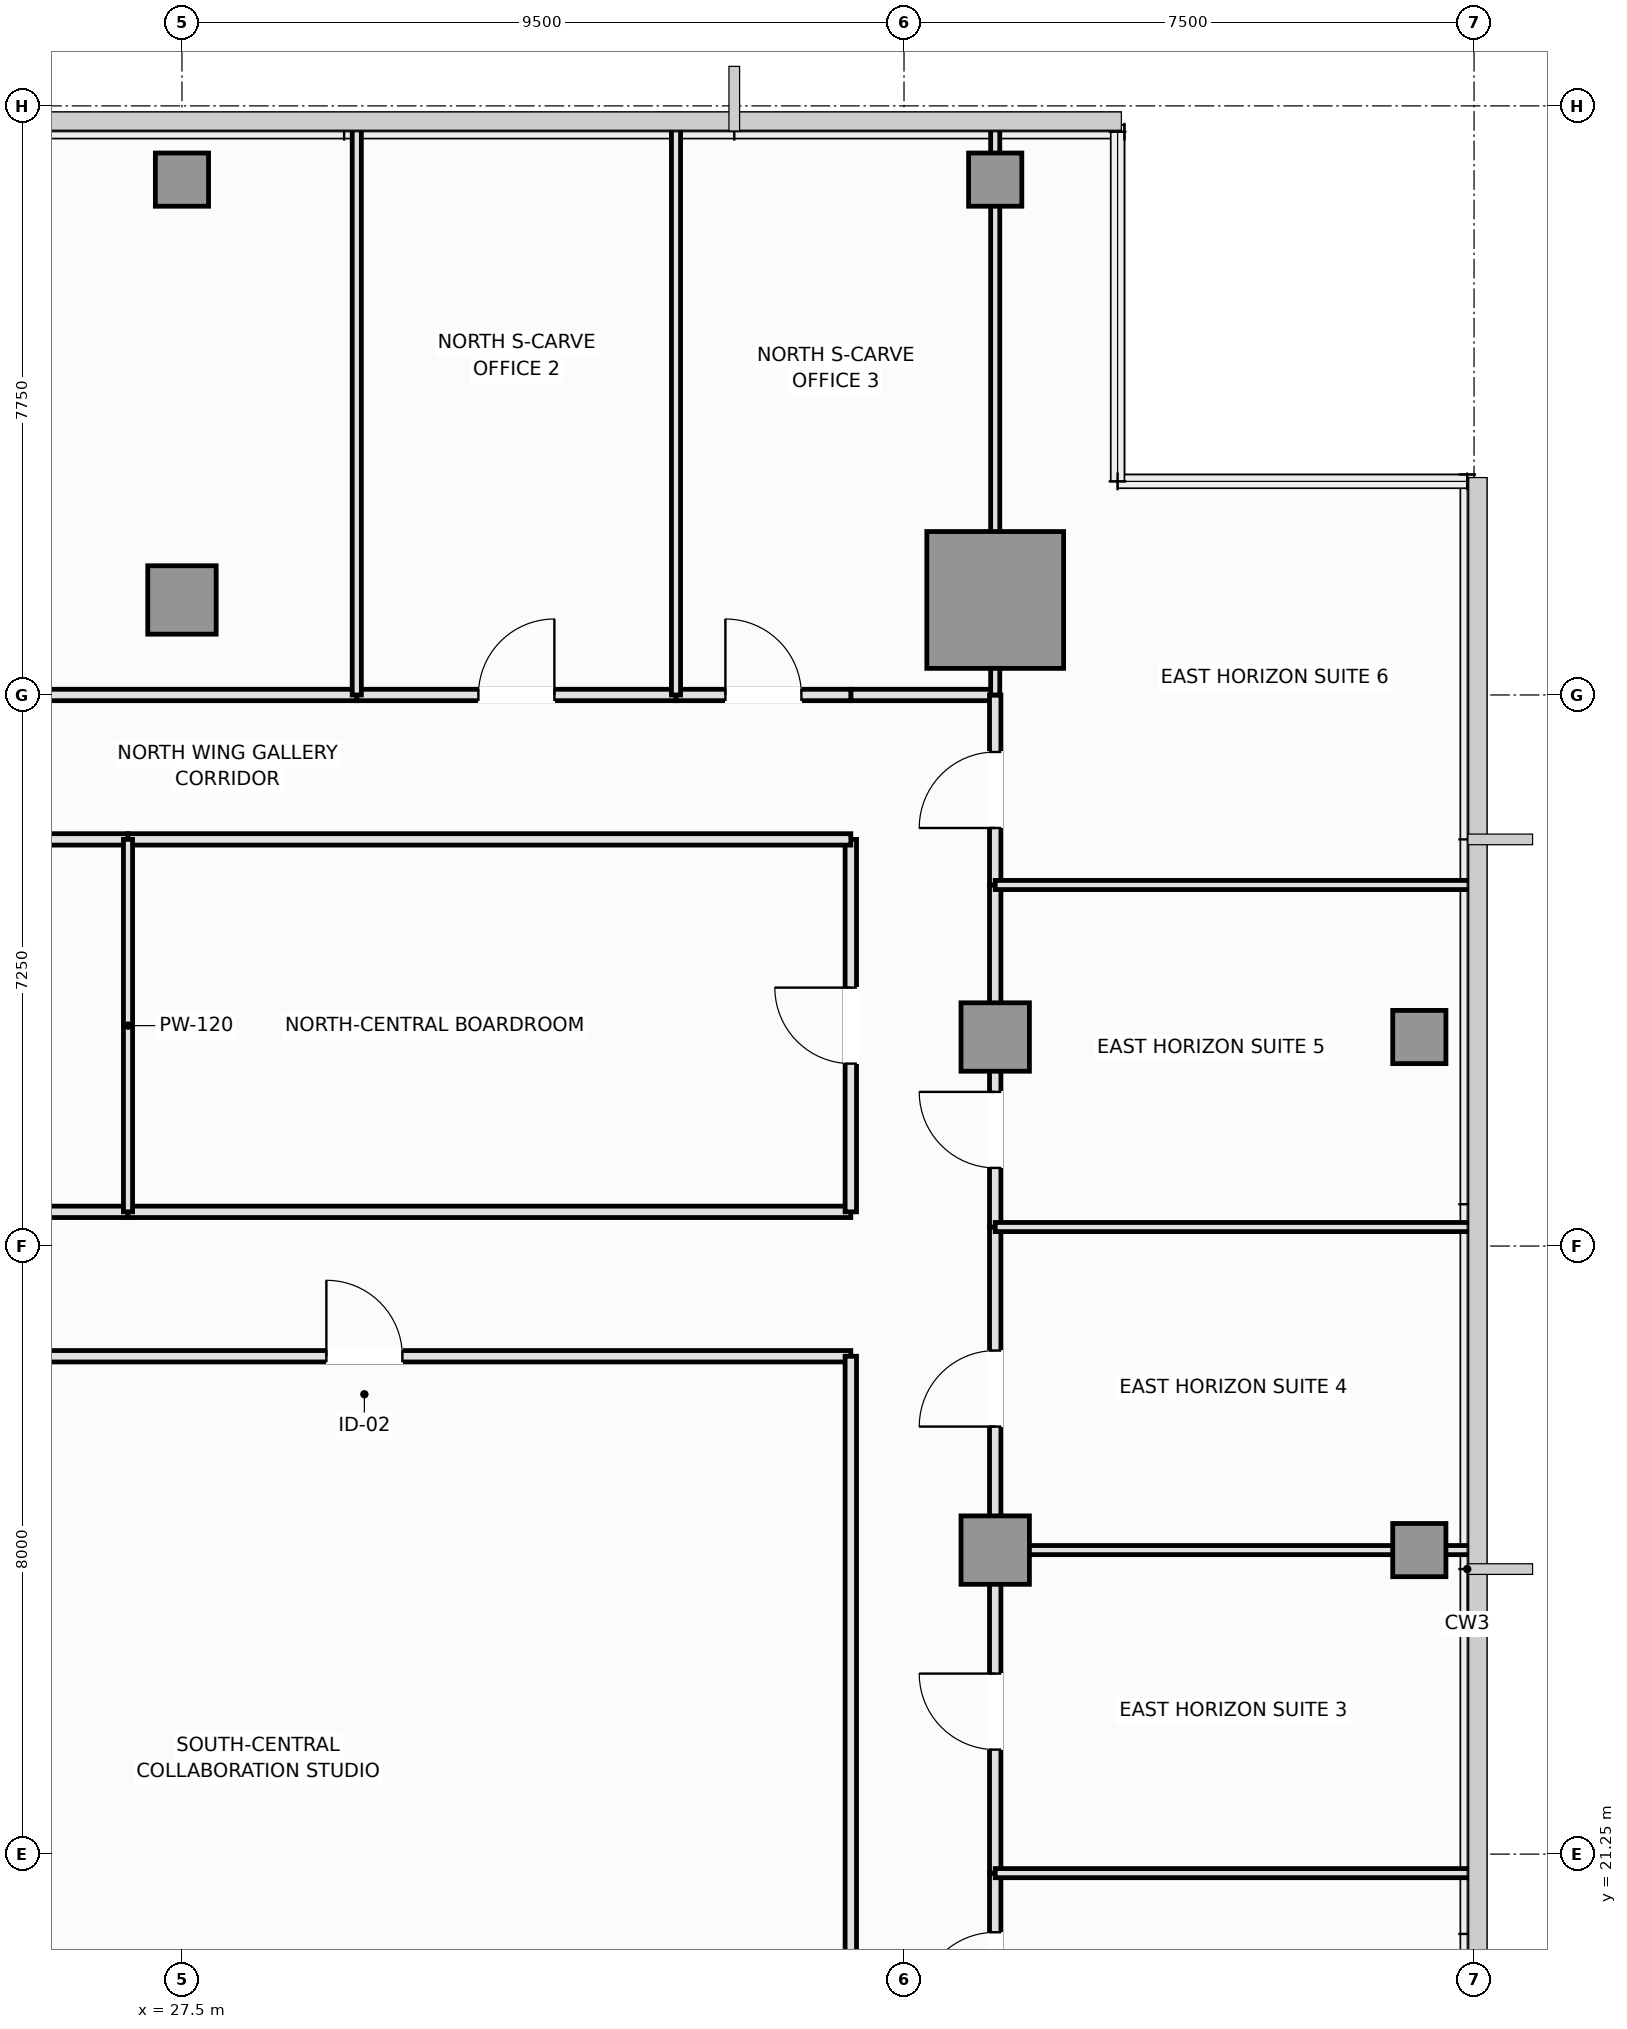
"""IFC4 building model, lengths in metres.
Left out: names, types, materials, properties, quantities, classifications, styles, units other than length and angle.
Written with IfcOpenShell. Run it as: python <this file> out.ifc"""

import sys

from ifc_helpers import new_model, si_unit, direction, frame, frame_2d, origin, origin_2d, place, context, subcontext, project, spatial, rectangle, extrude, element, fill, save


model = new_model("IFC4")
c1 = context("Model", 3, precision=1e-05, world=origin(), true_north=direction((0.0, 1.0)))
c2 = subcontext(c1, "Body", "Model", "MODEL_VIEW")
j1 = project(units=[si_unit("LENGTHUNIT", "METRE"), si_unit("PLANEANGLEUNIT", "RADIAN")], contexts=[c1])
p1 = place(None, origin())
s1 = spatial("IfcSite", under=j1, at=p1, CompositionType="ELEMENT")
p2 = place(p1, origin())
s2 = spatial("IfcBuilding", under=s1, at=p2, CompositionType="ELEMENT")
p3 = place(p2, frame((0.0, 0.0, 281.2)))
s3 = spatial("IfcBuildingStorey", under=s2, at=p3, CompositionType="ELEMENT", Elevation=281.2)
p4 = place(p3, frame((38.2, 37.75, 0.0), z_axis=(0.0, 0.0, 1.0), x_axis=(1.0, 0.0, 0.0)))
e1 = element("IfcColumn", 1, at=p4, inside=s3, PredefinedType="COLUMN", context=c2, shape_type="SweptSolid", body=[
    extrude(rectangle(XDim=1.8, YDim=1.8, at=origin_2d()), origin(), (0.0, 0.0, 1.0), 3.55),
])
for number, where, z_axis, x_axis in (
    (2, (27.5, 37.75, 0.0), (0.0, 0.0, 1.0), (1.0, 0.0, 0.0)),
    (3, (38.2, 25.25, 0.0), (0.0, 0.0, 1.0), (1.0, 0.0, 0.0)),
    (4, (38.2, 32.0, 0.0), (0.0, 0.0, 1.0), (1.0, 0.0, 0.0)),
):
    element("IfcColumn", number, at=place(p3, frame(where, z_axis=z_axis, x_axis=x_axis)), inside=s3, PredefinedType="COLUMN", context=c2, shape_type="SweptSolid", body=[
        extrude(rectangle(XDim=0.9, YDim=0.9, at=origin_2d()), origin(), (0.0, 0.0, 1.0), 3.55),
    ])
for number, where, z_axis, x_axis in (
    (5, (43.78, 25.25, 0.0), (0.0, 0.0, 1.0), (1.0, 0.0, 0.0)),
    (6, (43.78, 32.0, 0.0), (0.0, 0.0, 1.0), (1.0, 0.0, 0.0)),
    (7, (27.5, 43.28, 0.0), (0.0, 0.0, 1.0), (1.0, 0.0, 0.0)),
    (8, (38.2, 43.28, 0.0), (0.0, 0.0, 1.0), (1.0, 0.0, 0.0)),
):
    element("IfcColumn", number, at=place(p3, frame(where, z_axis=z_axis, x_axis=x_axis)), inside=s3, PredefinedType="COLUMN", context=c2, shape_type="SweptSolid", body=[
        extrude(rectangle(XDim=0.7, YDim=0.7, at=origin_2d()), origin(), (0.0, 0.0, 1.0), 3.55),
    ])
p5 = place(p3, frame((19.9, 29.7, 0.0), z_axis=(0.0, 0.0, 1.0), x_axis=(1.0, 0.0, 0.0)))
e9 = element("IfcWall", 9, at=p5, inside=s3, PredefinedType="PARTITIONING", context=c2, shape_type="SweptSolid", body=[
    extrude(rectangle(XDim=6.89, YDim=0.15, at=frame_2d((3.445, 0.0))), origin(), (0.0, 0.0, 1.0), 3.39),
])
p6 = place(p3, frame((26.79, 29.7, 0.0), z_axis=(0.0, 0.0, 1.0), x_axis=(1.0, 0.0, 0.0)))
e10 = element("IfcWall", 10, at=p6, inside=s3, PredefinedType="PARTITIONING", context=c2, shape_type="SweptSolid", body=[
    extrude(rectangle(XDim=9.51, YDim=0.15, at=frame_2d((4.755, 0.0))), origin(), (0.0, 0.0, 1.0), 3.39),
])
p7 = place(p3, frame((23.5, 27.8, 0.0), z_axis=(0.0, 0.0, 1.0), x_axis=(1.0, 0.0, 0.0)))
e11 = element("IfcWall", 11, at=p7, inside=s3, PredefinedType="PARTITIONING", context=c2, shape_type="SweptSolid", body=[
    extrude(rectangle(XDim=12.8, YDim=0.15, at=frame_2d((6.4, 0.0))), origin(), (0.0, 0.0, 1.0), 3.39),
])
p8 = place(p7, frame((5.9, 0.0, 0.0)))
e12 = element("IfcOpeningElement", 12, at=p8, cuts=e11, PredefinedType="OPENING", context=c2, shape_type="SweptSolid", body=[
    extrude(rectangle(XDim=1.0, YDim=2.15, at=frame_2d((0.5, 1.075))), frame((0.0, 0.085, 0.0), z_axis=(0.0, -1.0, 0.0), x_axis=(1.0, 0.0, 0.0)), (0.0, 0.0, 1.0), 0.17),
])
p9 = place(p3, frame((36.3, 29.7, 0.0), z_axis=(0.0, 0.0, 1.0), x_axis=(0.0, 1.0, 0.0)))
e13 = element("IfcWall", 13, at=p9, inside=s3, PredefinedType="PARTITIONING", context=c2, shape_type="SweptSolid", body=[
    extrude(rectangle(XDim=4.9, YDim=0.15, at=frame_2d((2.45, 0.0))), origin(), (0.0, 0.0, 1.0), 3.39),
])
p10 = place(p9, frame((1.95, 0.0, 0.0)))
e14 = element("IfcOpeningElement", 14, at=p10, cuts=e13, PredefinedType="OPENING", context=c2, shape_type="SweptSolid", body=[
    extrude(rectangle(XDim=1.0, YDim=2.15, at=frame_2d((0.5, 1.075))), frame((0.0, 0.085, 0.0), z_axis=(0.0, -1.0, 0.0), x_axis=(1.0, 0.0, 0.0)), (0.0, 0.0, 1.0), 0.17),
])
p11 = place(p3, frame((36.3, 17.6, 0.0), z_axis=(0.0, 0.0, 1.0), x_axis=(0.0, 1.0, 0.0)))
e15 = element("IfcWall", 15, at=p11, inside=s3, PredefinedType="PARTITIONING", context=c2, shape_type="SweptSolid", body=[
    extrude(rectangle(XDim=10.2, YDim=0.15, at=frame_2d((5.1, 0.0))), origin(), (0.0, 0.0, 1.0), 3.39),
])
p12 = place(p3, frame((36.3, 36.5, 0.0), z_axis=(0.0, 0.0, 1.0), x_axis=(1.0, 0.0, 0.0)))
e16 = element("IfcWall", 16, at=p12, inside=s3, PredefinedType="PARTITIONING", context=c2, shape_type="SweptSolid", body=[
    extrude(rectangle(XDim=1.9, YDim=0.15, at=frame_2d((0.95, 0.0))), origin(), (0.0, 0.0, 1.0), 3.39),
])
p13 = place(p3, frame((38.2, 16.5, 0.0), z_axis=(0.0, 0.0, 1.0), x_axis=(0.0, 1.0, 0.0)))
e17 = element("IfcWall", 17, at=p13, inside=s3, PredefinedType="PARTITIONING", context=c2, shape_type="SweptSolid", body=[
    extrude(rectangle(XDim=4.5, YDim=0.15, at=frame_2d((2.25, 0.0))), origin(), (0.0, 0.0, 1.0), 2.99),
])
p14 = place(p13, frame((2.722, 0.0, 0.0)))
e18 = element("IfcOpeningElement", 18, at=p14, cuts=e17, PredefinedType="OPENING", context=c2, shape_type="SweptSolid", body=[
    extrude(rectangle(XDim=1.0, YDim=2.15, at=frame_2d((0.5, 1.075))), frame((0.0, 0.085, 0.0), z_axis=(0.0, -1.0, 0.0), x_axis=(1.0, 0.0, 0.0)), (0.0, 0.0, 1.0), 0.17),
])
p15 = place(p3, frame((38.2, 21.0, 0.0), z_axis=(0.0, 0.0, 1.0), x_axis=(0.0, 1.0, 0.0)))
e19 = element("IfcWall", 19, at=p15, inside=s3, PredefinedType="PARTITIONING", context=c2, shape_type="SweptSolid", body=[
    extrude(rectangle(XDim=4.25, YDim=0.15, at=frame_2d((2.125, 0.0))), origin(), (0.0, 0.0, 1.0), 2.99),
])
p16 = place(p15, frame((1.625, 0.0, 0.0)))
e20 = element("IfcOpeningElement", 20, at=p16, cuts=e19, PredefinedType="OPENING", context=c2, shape_type="SweptSolid", body=[
    extrude(rectangle(XDim=1.0, YDim=2.15, at=frame_2d((0.5, 1.075))), frame((0.0, 0.085, 0.0), z_axis=(0.0, -1.0, 0.0), x_axis=(1.0, 0.0, 0.0)), (0.0, 0.0, 1.0), 0.17),
])
p17 = place(p3, frame((38.2, 25.25, 0.0), z_axis=(0.0, 0.0, 1.0), x_axis=(0.0, 1.0, 0.0)))
e21 = element("IfcWall", 21, at=p17, inside=s3, PredefinedType="PARTITIONING", context=c2, shape_type="SweptSolid", body=[
    extrude(rectangle(XDim=4.25, YDim=0.15, at=frame_2d((2.125, 0.0))), origin(), (0.0, 0.0, 1.0), 2.99),
])
p18 = place(p17, frame((1.625, 0.0, 0.0)))
e22 = element("IfcOpeningElement", 22, at=p18, cuts=e21, PredefinedType="OPENING", context=c2, shape_type="SweptSolid", body=[
    extrude(rectangle(XDim=1.0, YDim=2.15, at=frame_2d((0.5, 1.075))), frame((0.0, 0.085, 0.0), z_axis=(0.0, -1.0, 0.0), x_axis=(1.0, 0.0, 0.0)), (0.0, 0.0, 1.0), 0.17),
])
p19 = place(p3, frame((38.2, 29.5, 0.0), z_axis=(0.0, 0.0, 1.0), x_axis=(0.0, 1.0, 0.0)))
e23 = element("IfcWall", 23, at=p19, inside=s3, PredefinedType="PARTITIONING", context=c2, shape_type="SweptSolid", body=[
    extrude(rectangle(XDim=4.5, YDim=0.15, at=frame_2d((2.25, 0.0))), origin(), (0.0, 0.0, 1.0), 2.99),
])
p20 = place(p19, frame((0.778, 0.0, 0.0)))
e24 = element("IfcOpeningElement", 24, at=p20, cuts=e23, PredefinedType="OPENING", context=c2, shape_type="SweptSolid", body=[
    extrude(rectangle(XDim=1.0, YDim=2.15, at=frame_2d((0.5, 1.075))), frame((0.0, 0.085, 0.0), z_axis=(0.0, -1.0, 0.0), x_axis=(1.0, 0.0, 0.0)), (0.0, 0.0, 1.0), 0.17),
])
p21 = place(p3, frame((38.2, 34.0, 0.0), z_axis=(0.0, 0.0, 1.0), x_axis=(0.0, 1.0, 0.0)))
e25 = element("IfcWall", 25, at=p21, inside=s3, PredefinedType="PARTITIONING", context=c2, shape_type="SweptSolid", body=[
    extrude(rectangle(XDim=2.5, YDim=0.15, at=frame_2d((1.25, 0.0))), origin(), (0.0, 0.0, 1.0), 2.99),
])
p22 = place(p21, frame((0.75, 0.0, 0.0)))
e26 = element("IfcOpeningElement", 26, at=p22, cuts=e25, PredefinedType="OPENING", context=c2, shape_type="SweptSolid", body=[
    extrude(rectangle(XDim=1.0, YDim=2.15, at=frame_2d((0.5, 1.075))), frame((0.0, 0.085, 0.0), z_axis=(0.0, -1.0, 0.0), x_axis=(1.0, 0.0, 0.0)), (0.0, 0.0, 1.0), 0.17),
])
p23 = place(p3, frame((19.9, 34.6, 0.0), z_axis=(0.0, 0.0, 1.0), x_axis=(1.0, 0.0, 0.0)))
e27 = element("IfcWall", 27, at=p23, inside=s3, PredefinedType="PARTITIONING", context=c2, shape_type="SweptSolid", body=[
    extrude(rectangle(XDim=6.89, YDim=0.15, at=frame_2d((3.445, 0.0))), origin(), (0.0, 0.0, 1.0), 3.39),
])
p24 = place(p3, frame((26.79, 34.6, 0.0), z_axis=(0.0, 0.0, 1.0), x_axis=(1.0, 0.0, 0.0)))
e28 = element("IfcWall", 28, at=p24, inside=s3, PredefinedType="PARTITIONING", context=c2, shape_type="SweptSolid", body=[
    extrude(rectangle(XDim=9.51, YDim=0.15, at=frame_2d((4.755, 0.0))), origin(), (0.0, 0.0, 1.0), 3.39),
])
p25 = place(p3, frame((19.9, 36.5, 0.0), z_axis=(0.0, 0.0, 1.0), x_axis=(1.0, 0.0, 0.0)))
e29 = element("IfcWall", 29, at=p25, inside=s3, PredefinedType="PARTITIONING", context=c2, shape_type="SweptSolid", body=[
    extrude(rectangle(XDim=9.9, YDim=0.15, at=frame_2d((4.95, 0.0))), origin(), (0.0, 0.0, 1.0), 3.39),
])
p26 = place(p3, frame((29.8, 36.5, 0.0), z_axis=(0.0, 0.0, 1.0), x_axis=(1.0, 0.0, 0.0)))
e30 = element("IfcWall", 30, at=p26, inside=s3, PredefinedType="PARTITIONING", context=c2, shape_type="SweptSolid", body=[
    extrude(rectangle(XDim=4.2, YDim=0.15, at=frame_2d((2.1, 0.0))), origin(), (0.0, 0.0, 1.0), 3.39),
])
p27 = place(p26, frame((1.6, 0.0, 0.0)))
e31 = element("IfcOpeningElement", 31, at=p27, cuts=e30, PredefinedType="OPENING", context=c2, shape_type="SweptSolid", body=[
    extrude(rectangle(XDim=1.0, YDim=2.15, at=frame_2d((0.5, 1.075))), frame((0.0, 0.085, 0.0), z_axis=(0.0, -1.0, 0.0), x_axis=(1.0, 0.0, 0.0)), (0.0, 0.0, 1.0), 0.17),
])
p28 = place(p3, frame((34.0, 36.5, 0.0), z_axis=(0.0, 0.0, 1.0), x_axis=(1.0, 0.0, 0.0)))
e32 = element("IfcWall", 32, at=p28, inside=s3, PredefinedType="PARTITIONING", context=c2, shape_type="SweptSolid", body=[
    extrude(rectangle(XDim=2.3, YDim=0.15, at=frame_2d((1.15, 0.0))), origin(), (0.0, 0.0, 1.0), 3.39),
])
p29 = place(p28, frame((0.65, 0.0, 0.0)))
e33 = element("IfcOpeningElement", 33, at=p29, cuts=e32, PredefinedType="OPENING", context=c2, shape_type="SweptSolid", body=[
    extrude(rectangle(XDim=1.0, YDim=2.15, at=frame_2d((0.5, 1.075))), frame((0.0, 0.085, 0.0), z_axis=(0.0, -1.0, 0.0), x_axis=(1.0, 0.0, 0.0)), (0.0, 0.0, 1.0), 0.17),
])
p30 = place(p3, frame((26.79, 29.7, 0.0), z_axis=(0.0, 0.0, 1.0), x_axis=(0.0, 1.0, 0.0)))
e34 = element("IfcWall", 34, at=p30, inside=s3, PredefinedType="PARTITIONING", context=c2, shape_type="SweptSolid", body=[
    extrude(rectangle(XDim=4.9, YDim=0.12, at=frame_2d((2.45, 0.0))), origin(), (0.0, 0.0, 1.0), 3.39),
])
for number, where, z_axis, x_axis in (
    (35, (29.8, 36.5, 0.0), (0.0, 0.0, 1.0), (0.0, 1.0, 0.0)),
    (36, (34.0, 36.5, 0.0), (0.0, 0.0, 1.0), (0.0, 1.0, 0.0)),
):
    element("IfcWall", number, at=place(p3, frame(where, z_axis=z_axis, x_axis=x_axis)), inside=s3, PredefinedType="PARTITIONING", context=c2, shape_type="SweptSolid", body=[
        extrude(rectangle(XDim=7.49, YDim=0.12, at=frame_2d((3.745, 0.0))), origin(), (0.0, 0.0, 1.0), 3.39),
    ])
p31 = place(p3, frame((38.2, 36.5, 0.0), z_axis=(0.0, 0.0, 1.0), x_axis=(0.0, 1.0, 0.0)))
e37 = element("IfcWall", 37, at=p31, inside=s3, PredefinedType="PARTITIONING", context=c2, shape_type="SweptSolid", body=[
    extrude(rectangle(XDim=7.49, YDim=0.12, at=frame_2d((3.745, 0.0))), origin(), (0.0, 0.0, 1.0), 2.99),
])
p32 = place(p3, frame((38.2, 21.0, 0.0), z_axis=(0.0, 0.0, 1.0), x_axis=(1.0, 0.0, 0.0)))
e38 = element("IfcWall", 38, at=p32, inside=s3, PredefinedType="PARTITIONING", context=c2, shape_type="SweptSolid", body=[
    extrude(rectangle(XDim=6.29, YDim=0.12, at=frame_2d((3.145, 0.0))), origin(), (0.0, 0.0, 1.0), 3.39),
])
p33 = place(p3, frame((38.2, 25.25, 0.0), z_axis=(0.0, 0.0, 1.0), x_axis=(1.0, 0.0, 0.0)))
e39 = element("IfcWall", 39, at=p33, inside=s3, PredefinedType="PARTITIONING", context=c2, shape_type="SweptSolid", body=[
    extrude(rectangle(XDim=6.29, YDim=0.12, at=frame_2d((3.145, 0.0))), origin(), (0.0, 0.0, 1.0), 2.94),
])
for number, where, z_axis, x_axis in (
    (40, (38.2, 29.5, 0.0), (0.0, 0.0, 1.0), (1.0, 0.0, 0.0)),
    (41, (38.2, 34.0, 0.0), (0.0, 0.0, 1.0), (1.0, 0.0, 0.0)),
):
    element("IfcWall", number, at=place(p3, frame(where, z_axis=z_axis, x_axis=x_axis)), inside=s3, PredefinedType="PARTITIONING", context=c2, shape_type="SweptSolid", body=[
        extrude(rectangle(XDim=6.29, YDim=0.12, at=frame_2d((3.145, 0.0))), origin(), (0.0, 0.0, 1.0), 3.39),
    ])
p34 = place(p8, origin())
e42 = element("IfcDoor", 42, at=p34, inside=s3, OperationType="SINGLE_SWING_LEFT", PredefinedType="DOOR", context=c2, shape_type="SweptSolid", body=[
    extrude(rectangle(XDim=1.0, YDim=2.15, at=frame_2d((0.5, 1.075))), frame((0.0, 0.025, 0.0), z_axis=(0.0, -1.0, 0.0), x_axis=(1.0, 0.0, 0.0)), (0.0, 0.0, 1.0), 0.05),
])
fill(e12, e42)
p35 = place(p10, origin())
e43 = element("IfcDoor", 43, at=p35, inside=s3, OperationType="SINGLE_SWING_RIGHT", PredefinedType="DOOR", context=c2, shape_type="SweptSolid", body=[
    extrude(rectangle(XDim=1.0, YDim=2.15, at=frame_2d((0.5, 1.075))), frame((0.0, 0.025, 0.0), z_axis=(0.0, -1.0, 0.0), x_axis=(1.0, 0.0, 0.0)), (0.0, 0.0, 1.0), 0.05),
])
fill(e14, e43)
p36 = place(p14, origin())
e44 = element("IfcDoor", 44, at=p36, inside=s3, OperationType="SINGLE_SWING_LEFT", PredefinedType="DOOR", context=c2, shape_type="SweptSolid", body=[
    extrude(rectangle(XDim=1.0, YDim=2.15, at=frame_2d((0.5, 1.075))), frame((0.0, 0.025, 0.0), z_axis=(0.0, -1.0, 0.0), x_axis=(1.0, 0.0, 0.0)), (0.0, 0.0, 1.0), 0.05),
])
fill(e18, e44)
p37 = place(p16, origin())
e45 = element("IfcDoor", 45, at=p37, inside=s3, OperationType="SINGLE_SWING_RIGHT", PredefinedType="DOOR", context=c2, shape_type="SweptSolid", body=[
    extrude(rectangle(XDim=1.0, YDim=2.15, at=frame_2d((0.5, 1.075))), frame((0.0, 0.025, 0.0), z_axis=(0.0, -1.0, 0.0), x_axis=(1.0, 0.0, 0.0)), (0.0, 0.0, 1.0), 0.05),
])
fill(e20, e45)
p38 = place(p18, origin())
e46 = element("IfcDoor", 46, at=p38, inside=s3, OperationType="SINGLE_SWING_LEFT", PredefinedType="DOOR", context=c2, shape_type="SweptSolid", body=[
    extrude(rectangle(XDim=1.0, YDim=2.15, at=frame_2d((0.5, 1.075))), frame((0.0, 0.025, 0.0), z_axis=(0.0, -1.0, 0.0), x_axis=(1.0, 0.0, 0.0)), (0.0, 0.0, 1.0), 0.05),
])
fill(e22, e46)
p39 = place(p20, origin())
e47 = element("IfcDoor", 47, at=p39, inside=s3, OperationType="SINGLE_SWING_RIGHT", PredefinedType="DOOR", context=c2, shape_type="SweptSolid", body=[
    extrude(rectangle(XDim=1.0, YDim=2.15, at=frame_2d((0.5, 1.075))), frame((0.0, 0.025, 0.0), z_axis=(0.0, -1.0, 0.0), x_axis=(1.0, 0.0, 0.0)), (0.0, 0.0, 1.0), 0.05),
])
fill(e24, e47)
p40 = place(p22, origin())
e48 = element("IfcDoor", 48, at=p40, inside=s3, OperationType="SINGLE_SWING_LEFT", PredefinedType="DOOR", context=c2, shape_type="SweptSolid", body=[
    extrude(rectangle(XDim=1.0, YDim=2.15, at=frame_2d((0.5, 1.075))), frame((0.0, 0.025, 0.0), z_axis=(0.0, -1.0, 0.0), x_axis=(1.0, 0.0, 0.0)), (0.0, 0.0, 1.0), 0.05),
])
fill(e26, e48)
p41 = place(p27, origin())
e49 = element("IfcDoor", 49, at=p41, inside=s3, OperationType="SINGLE_SWING_RIGHT", PredefinedType="DOOR", context=c2, shape_type="SweptSolid", body=[
    extrude(rectangle(XDim=1.0, YDim=2.15, at=frame_2d((0.5, 1.075))), frame((0.0, 0.025, 0.0), z_axis=(0.0, -1.0, 0.0), x_axis=(1.0, 0.0, 0.0)), (0.0, 0.0, 1.0), 0.05),
])
fill(e31, e49)
p42 = place(p29, origin())
e50 = element("IfcDoor", 50, at=p42, inside=s3, OperationType="SINGLE_SWING_LEFT", PredefinedType="DOOR", context=c2, shape_type="SweptSolid", body=[
    extrude(rectangle(XDim=1.0, YDim=2.15, at=frame_2d((0.5, 1.075))), frame((0.0, 0.025, 0.0), z_axis=(0.0, -1.0, 0.0), x_axis=(1.0, 0.0, 0.0)), (0.0, 0.0, 1.0), 0.05),
])
fill(e33, e50)
save(model, sys.argv[1])
